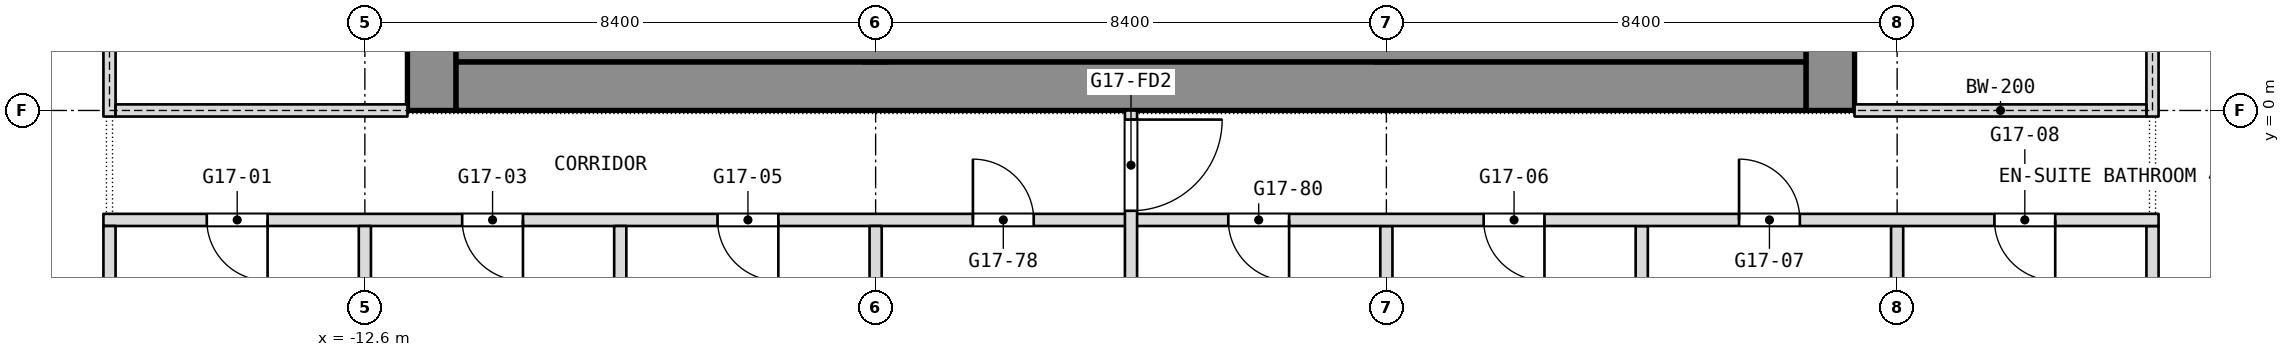
"""IFC4 building model, lengths in metres.
Left out: names, types, materials, properties, quantities, classifications, styles, units other than length and angle.
Written with IfcOpenShell. Run it as: python <this file> out.ifc"""

import sys

from ifc_helpers import new_model, si_unit, direction, frame, frame_2d, origin, place, context, subcontext, project, spatial, rectangle, extrude, element, fill, save


model = new_model("IFC4")
c1 = context("Model", 3, precision=1e-05, world=origin(), true_north=direction((0.0, 1.0)))
c2 = subcontext(c1, "Body", "Model", "MODEL_VIEW")
j1 = project(units=[si_unit("LENGTHUNIT", "METRE"), si_unit("PLANEANGLEUNIT", "RADIAN")], contexts=[c1])
p1 = place(None, origin())
s1 = spatial("IfcSite", under=j1, at=p1, CompositionType="ELEMENT")
p2 = place(p1, origin())
s2 = spatial("IfcBuilding", under=s1, at=p2, CompositionType="ELEMENT")
p3 = place(p2, frame((0.0, 0.0, 212.9)))
s3 = spatial("IfcBuildingStorey", under=s2, at=p3, CompositionType="ELEMENT", Elevation=212.9)
p4 = place(p3, frame((11.5, 0.0, 0.0), z_axis=(0.0, 0.0, 1.0), x_axis=(0.0, 1.0, 0.0)))
e1 = element("IfcWall", 1, at=p4, inside=s3, PredefinedType="SHEAR", context=c2, shape_type="SweptSolid", body=[
    extrude(rectangle(XDim=16.8, YDim=0.8, at=frame_2d((8.4, 0.0))), origin(), (0.0, 0.0, 1.0), 3.6),
])
p5 = place(p4, frame((2.3, 0.0, 0.0)))
e2 = element("IfcOpeningElement", 2, at=p5, cuts=e1, PredefinedType="OPENING", context=c2, shape_type="SweptSolid", body=[
    extrude(rectangle(XDim=1.1, YDim=2.1, at=frame_2d((0.55, 1.05))), frame((0.0, 0.4, 0.0), z_axis=(0.0, -1.0, 0.0), x_axis=(1.0, 0.0, 0.0)), (0.0, 0.0, 1.0), 0.8),
])
p6 = place(p4, frame((4.85, 0.0, 0.0)))
e3 = element("IfcOpeningElement", 3, at=p6, cuts=e1, PredefinedType="OPENING", context=c2, shape_type="SweptSolid", body=[
    extrude(rectangle(XDim=1.1, YDim=2.1, at=frame_2d((0.55, 1.05))), frame((0.0, 0.4, 0.0), z_axis=(0.0, -1.0, 0.0), x_axis=(1.0, 0.0, 0.0)), (0.0, 0.0, 1.0), 0.8),
])
p7 = place(p4, frame((6.825, 0.0, 0.0)))
e4 = element("IfcOpeningElement", 4, at=p7, cuts=e1, PredefinedType="OPENING", context=c2, shape_type="SweptSolid", body=[
    extrude(rectangle(XDim=1.2, YDim=2.1, at=frame_2d((0.6, 1.05))), frame((0.0, 0.4, 0.0), z_axis=(0.0, -1.0, 0.0), x_axis=(1.0, 0.0, 0.0)), (0.0, 0.0, 1.0), 0.8),
])
p8 = place(p4, frame((13.4, 0.0, 0.0)))
e5 = element("IfcOpeningElement", 5, at=p8, cuts=e1, PredefinedType="OPENING", context=c2, shape_type="SweptSolid", body=[
    extrude(rectangle(XDim=1.1, YDim=2.1, at=frame_2d((0.55, 1.05))), frame((0.0, 0.4, 0.0), z_axis=(0.0, -1.0, 0.0), x_axis=(1.0, 0.0, 0.0)), (0.0, 0.0, 1.0), 0.8),
])
p9 = place(p4, frame((10.85, 0.0, 0.0)))
e6 = element("IfcOpeningElement", 6, at=p9, cuts=e1, PredefinedType="OPENING", context=c2, shape_type="SweptSolid", body=[
    extrude(rectangle(XDim=1.1, YDim=2.1, at=frame_2d((0.55, 1.05))), frame((0.0, 0.4, 0.0), z_axis=(0.0, -1.0, 0.0), x_axis=(1.0, 0.0, 0.0)), (0.0, 0.0, 1.0), 0.8),
])
p10 = place(p4, frame((8.775, 0.0, 0.0)))
e7 = element("IfcOpeningElement", 7, at=p10, cuts=e1, PredefinedType="OPENING", context=c2, shape_type="SweptSolid", body=[
    extrude(rectangle(XDim=1.2, YDim=2.1, at=frame_2d((0.6, 1.05))), frame((0.0, 0.4, 0.0), z_axis=(0.0, -1.0, 0.0), x_axis=(1.0, 0.0, 0.0)), (0.0, 0.0, 1.0), 0.8),
])
p11 = place(p3, frame((-11.5, 0.0, 0.0), z_axis=(0.0, 0.0, 1.0), x_axis=(0.0, 1.0, 0.0)))
e8 = element("IfcWall", 8, at=p11, inside=s3, PredefinedType="SHEAR", context=c2, shape_type="SweptSolid", body=[
    extrude(rectangle(XDim=16.8, YDim=0.8, at=frame_2d((8.4, 0.0))), origin(), (0.0, 0.0, 1.0), 3.6),
])
p12 = place(p11, frame((1.762, 0.0, 0.0)))
e9 = element("IfcOpeningElement", 9, at=p12, cuts=e8, PredefinedType="OPENING", context=c2, shape_type="SweptSolid", body=[
    extrude(rectangle(XDim=0.9, YDim=2.1, at=frame_2d((0.45, 1.05))), frame((0.0, 0.4, 0.0), z_axis=(0.0, -1.0, 0.0), x_axis=(1.0, 0.0, 0.0)), (0.0, 0.0, 1.0), 0.8),
])
p13 = place(p11, frame((4.387, 0.0, 0.0)))
e10 = element("IfcOpeningElement", 10, at=p13, cuts=e8, PredefinedType="OPENING", context=c2, shape_type="SweptSolid", body=[
    extrude(rectangle(XDim=0.9, YDim=2.1, at=frame_2d((0.45, 1.05))), frame((0.0, 0.4, 0.0), z_axis=(0.0, -1.0, 0.0), x_axis=(1.0, 0.0, 0.0)), (0.0, 0.0, 1.0), 0.8),
])
p14 = place(p11, frame((6.825, 0.0, 0.0)))
e11 = element("IfcOpeningElement", 11, at=p14, cuts=e8, PredefinedType="OPENING", context=c2, shape_type="SweptSolid", body=[
    extrude(rectangle(XDim=1.2, YDim=2.1, at=frame_2d((0.6, 1.05))), frame((0.0, 0.4, 0.0), z_axis=(0.0, -1.0, 0.0), x_axis=(1.0, 0.0, 0.0)), (0.0, 0.0, 1.0), 0.8),
])
p15 = place(p11, frame((12.3, 0.0, 0.0)))
e12 = element("IfcOpeningElement", 12, at=p15, cuts=e8, PredefinedType="OPENING", context=c2, shape_type="SweptSolid", body=[
    extrude(rectangle(XDim=0.9, YDim=2.1, at=frame_2d((0.45, 1.05))), frame((0.0, 0.4, 0.0), z_axis=(0.0, -1.0, 0.0), x_axis=(1.0, 0.0, 0.0)), (0.0, 0.0, 1.0), 0.8),
])
p16 = place(p11, frame((8.775, 0.0, 0.0)))
e13 = element("IfcOpeningElement", 13, at=p16, cuts=e8, PredefinedType="OPENING", context=c2, shape_type="SweptSolid", body=[
    extrude(rectangle(XDim=1.2, YDim=2.1, at=frame_2d((0.6, 1.05))), frame((0.0, 0.4, 0.0), z_axis=(0.0, -1.0, 0.0), x_axis=(1.0, 0.0, 0.0)), (0.0, 0.0, 1.0), 0.8),
])
p17 = place(p3, frame((-11.1, 0.4, 0.0), z_axis=(0.0, 0.0, 1.0), x_axis=(1.0, 0.0, 0.0)))
e14 = element("IfcWall", 14, at=p17, inside=s3, PredefinedType="SHEAR", context=c2, shape_type="SweptSolid", body=[
    extrude(rectangle(XDim=22.2, YDim=0.8, at=frame_2d((11.1, 0.0))), origin(), (0.0, 0.0, 1.0), 3.6),
])
p18 = place(p3, frame((-4.2, 0.8, 0.0), z_axis=(0.0, 0.0, 1.0), x_axis=(0.0, 1.0, 0.0)))
e15 = element("IfcWall", 15, at=p18, inside=s3, PredefinedType="SHEAR", context=c2, shape_type="SweptSolid", body=[
    extrude(rectangle(XDim=15.2, YDim=0.4, at=frame_2d((7.6, 0.0))), origin(), (0.0, 0.0, 1.0), 3.6),
])
p19 = place(p18, frame((8.5, 0.0, 0.0)))
e16 = element("IfcOpeningElement", 16, at=p19, cuts=e15, PredefinedType="OPENING", context=c2, shape_type="SweptSolid", body=[
    extrude(rectangle(XDim=1.2, YDim=2.1, at=frame_2d((0.6, 1.05))), frame((0.0, 0.2, 0.0), z_axis=(0.0, -1.0, 0.0), x_axis=(1.0, 0.0, 0.0)), (0.0, 0.0, 1.0), 0.4),
])
p20 = place(p3, frame((4.2, 0.8, 0.0), z_axis=(0.0, 0.0, 1.0), x_axis=(0.0, 1.0, 0.0)))
e17 = element("IfcWall", 17, at=p20, inside=s3, PredefinedType="SHEAR", context=c2, shape_type="SweptSolid", body=[
    extrude(rectangle(XDim=15.2, YDim=0.4, at=frame_2d((7.6, 0.0))), origin(), (0.0, 0.0, 1.0), 3.6),
])
p21 = place(p20, frame((5.95, 0.0, 0.0)))
e18 = element("IfcOpeningElement", 18, at=p21, cuts=e17, PredefinedType="OPENING", context=c2, shape_type="SweptSolid", body=[
    extrude(rectangle(XDim=1.2, YDim=2.1, at=frame_2d((0.6, 1.05))), frame((0.0, 0.2, 0.0), z_axis=(0.0, -1.0, 0.0), x_axis=(1.0, 0.0, 0.0)), (0.0, 0.0, 1.0), 0.4),
])
for number, where, z_axis, x_axis in (
    (19, (16.8, -7.8, 0.0), (0.0, 0.0, 1.0), (0.0, 1.0, 0.0)),
    (20, (12.6, -7.8, 0.0), (0.0, 0.0, 1.0), (0.0, 1.0, 0.0)),
):
    element("IfcWall", number, at=place(p3, frame(where, z_axis=z_axis, x_axis=x_axis)), inside=s3, PredefinedType="PARTITIONING", context=c2, shape_type="SweptSolid", body=[
        extrude(rectangle(XDim=5.9, YDim=0.2, at=frame_2d((2.95, 0.0))), origin(), (0.0, 0.0, 1.0), 3.34),
    ])
p22 = place(p3, frame((8.4, -8.0, 0.0), z_axis=(0.0, 0.0, 1.0), x_axis=(0.0, 1.0, 0.0)))
e21 = element("IfcWall", 21, at=p22, inside=s3, PredefinedType="PARTITIONING", context=c2, shape_type="SweptSolid", body=[
    extrude(rectangle(XDim=6.1, YDim=0.2, at=frame_2d((3.05, 0.0))), origin(), (0.0, 0.0, 1.0), 3.34),
])
p23 = place(p3, frame((4.2, -11.6, 0.0), z_axis=(0.0, 0.0, 1.0), x_axis=(0.0, 1.0, 0.0)))
e22 = element("IfcWall", 22, at=p23, inside=s3, PredefinedType="PARTITIONING", context=c2, shape_type="SweptSolid", body=[
    extrude(rectangle(XDim=9.7, YDim=0.2, at=frame_2d((4.85, 0.0))), origin(), (0.0, 0.0, 1.0), 3.34),
])
p24 = place(p3, frame((-16.9, -1.8, 0.0), z_axis=(0.0, 0.0, 1.0), x_axis=(1.0, 0.0, 0.0)))
e23 = element("IfcWall", 23, at=p24, inside=s3, PredefinedType="PARTITIONING", context=c2, shape_type="SweptSolid", body=[
    extrude(rectangle(XDim=33.8, YDim=0.2, at=frame_2d((16.9, 0.0))), origin(), (0.0, 0.0, 1.0), 3.34),
])
p25 = place(p24, frame((1.7, 0.0, 0.0)))
e24 = element("IfcOpeningElement", 24, at=p25, cuts=e23, PredefinedType="OPENING", context=c2, shape_type="SweptSolid", body=[
    extrude(rectangle(XDim=1.0, YDim=2.1, at=frame_2d((0.5, 1.05))), frame((0.0, 0.1, 0.0), z_axis=(0.0, -1.0, 0.0), x_axis=(1.0, 0.0, 0.0)), (0.0, 0.0, 1.0), 0.2),
])
p26 = place(p24, frame((5.9, 0.0, 0.0)))
e25 = element("IfcOpeningElement", 25, at=p26, cuts=e23, PredefinedType="OPENING", context=c2, shape_type="SweptSolid", body=[
    extrude(rectangle(XDim=1.0, YDim=2.1, at=frame_2d((0.5, 1.05))), frame((0.0, 0.1, 0.0), z_axis=(0.0, -1.0, 0.0), x_axis=(1.0, 0.0, 0.0)), (0.0, 0.0, 1.0), 0.2),
])
p27 = place(p24, frame((10.1, 0.0, 0.0)))
e26 = element("IfcOpeningElement", 26, at=p27, cuts=e23, PredefinedType="OPENING", context=c2, shape_type="SweptSolid", body=[
    extrude(rectangle(XDim=1.0, YDim=2.1, at=frame_2d((0.5, 1.05))), frame((0.0, 0.1, 0.0), z_axis=(0.0, -1.0, 0.0), x_axis=(1.0, 0.0, 0.0)), (0.0, 0.0, 1.0), 0.2),
])
p28 = place(p24, frame((22.7, 0.0, 0.0)))
e27 = element("IfcOpeningElement", 27, at=p28, cuts=e23, PredefinedType="OPENING", context=c2, shape_type="SweptSolid", body=[
    extrude(rectangle(XDim=1.0, YDim=2.1, at=frame_2d((0.5, 1.05))), frame((0.0, 0.1, 0.0), z_axis=(0.0, -1.0, 0.0), x_axis=(1.0, 0.0, 0.0)), (0.0, 0.0, 1.0), 0.2),
])
p29 = place(p24, frame((26.9, 0.0, 0.0)))
e28 = element("IfcOpeningElement", 28, at=p29, cuts=e23, PredefinedType="OPENING", context=c2, shape_type="SweptSolid", body=[
    extrude(rectangle(XDim=1.0, YDim=2.1, at=frame_2d((0.5, 1.05))), frame((0.0, 0.1, 0.0), z_axis=(0.0, -1.0, 0.0), x_axis=(1.0, 0.0, 0.0)), (0.0, 0.0, 1.0), 0.2),
])
p30 = place(p24, frame((31.1, 0.0, 0.0)))
e29 = element("IfcOpeningElement", 29, at=p30, cuts=e23, PredefinedType="OPENING", context=c2, shape_type="SweptSolid", body=[
    extrude(rectangle(XDim=1.0, YDim=2.1, at=frame_2d((0.5, 1.05))), frame((0.0, 0.1, 0.0), z_axis=(0.0, -1.0, 0.0), x_axis=(1.0, 0.0, 0.0)), (0.0, 0.0, 1.0), 0.2),
])
p31 = place(p24, frame((14.3, 0.0, 0.0)))
e30 = element("IfcOpeningElement", 30, at=p31, cuts=e23, PredefinedType="OPENING", context=c2, shape_type="SweptSolid", body=[
    extrude(rectangle(XDim=1.0, YDim=2.1, at=frame_2d((0.5, 1.05))), frame((0.0, 0.1, 0.0), z_axis=(0.0, -1.0, 0.0), x_axis=(1.0, 0.0, 0.0)), (0.0, 0.0, 1.0), 0.2),
])
p32 = place(p24, frame((18.5, 0.0, 0.0)))
e31 = element("IfcOpeningElement", 31, at=p32, cuts=e23, PredefinedType="OPENING", context=c2, shape_type="SweptSolid", body=[
    extrude(rectangle(XDim=1.0, YDim=2.1, at=frame_2d((0.5, 1.05))), frame((0.0, 0.1, 0.0), z_axis=(0.0, -1.0, 0.0), x_axis=(1.0, 0.0, 0.0)), (0.0, 0.0, 1.0), 0.2),
])
p33 = place(p3, frame((0.0, -13.6, 0.0), z_axis=(0.0, 0.0, 1.0), x_axis=(0.0, 1.0, 0.0)))
e32 = element("IfcWall", 32, at=p33, inside=s3, PredefinedType="PARTITIONING", context=c2, shape_type="SweptSolid", body=[
    extrude(rectangle(XDim=13.6, YDim=0.2, at=frame_2d((6.8, 0.0))), origin(), (0.0, 0.0, 1.0), 3.34),
])
p34 = place(p33, frame((11.95, 0.0, 0.0)))
e33 = element("IfcOpeningElement", 33, at=p34, cuts=e32, PredefinedType="OPENING", context=c2, shape_type="SweptSolid", body=[
    extrude(rectangle(XDim=1.5, YDim=2.1, at=frame_2d((0.75, 1.05))), frame((0.0, 0.1, 0.0), z_axis=(0.0, -1.0, 0.0), x_axis=(1.0, 0.0, 0.0)), (0.0, 0.0, 1.0), 0.2),
])
p35 = place(p33, frame((0.25, 0.0, 0.0)))
e34 = element("IfcOpeningElement", 34, at=p35, cuts=e32, PredefinedType="OPENING", context=c2, shape_type="SweptSolid", body=[
    extrude(rectangle(XDim=1.5, YDim=2.1, at=frame_2d((0.75, 1.05))), frame((0.0, 0.1, 0.0), z_axis=(0.0, -1.0, 0.0), x_axis=(1.0, 0.0, 0.0)), (0.0, 0.0, 1.0), 0.2),
])
p36 = place(p3, frame((-4.2, -11.6, 0.0), z_axis=(0.0, 0.0, 1.0), x_axis=(0.0, 1.0, 0.0)))
e35 = element("IfcWall", 35, at=p36, inside=s3, PredefinedType="PARTITIONING", context=c2, shape_type="SweptSolid", body=[
    extrude(rectangle(XDim=9.7, YDim=0.2, at=frame_2d((4.85, 0.0))), origin(), (0.0, 0.0, 1.0), 3.34),
])
p37 = place(p3, frame((-8.4, -8.0, 0.0), z_axis=(0.0, 0.0, 1.0), x_axis=(0.0, 1.0, 0.0)))
e36 = element("IfcWall", 36, at=p37, inside=s3, PredefinedType="PARTITIONING", context=c2, shape_type="SweptSolid", body=[
    extrude(rectangle(XDim=6.1, YDim=0.2, at=frame_2d((3.05, 0.0))), origin(), (0.0, 0.0, 1.0), 3.34),
])
p38 = place(p3, frame((-12.6, -7.8, 0.0), z_axis=(0.0, 0.0, 1.0), x_axis=(0.0, 1.0, 0.0)))
e37 = element("IfcWall", 37, at=p38, inside=s3, PredefinedType="PARTITIONING", context=c2, shape_type="SweptSolid", body=[
    extrude(rectangle(XDim=5.9, YDim=0.2, at=frame_2d((2.95, 0.0))), origin(), (0.0, 0.0, 1.0), 3.34),
])
p39 = place(p3, frame((-16.8, -8.0, 0.0), z_axis=(0.0, 0.0, 1.0), x_axis=(0.0, 1.0, 0.0)))
e38 = element("IfcWall", 38, at=p39, inside=s3, PredefinedType="PARTITIONING", context=c2, shape_type="SweptSolid", body=[
    extrude(rectangle(XDim=6.1, YDim=0.2, at=frame_2d((3.05, 0.0))), origin(), (0.0, 0.0, 1.0), 3.34),
])
p40 = place(p3, frame((-11.1, 1.15, 0.0), z_axis=(0.0, 0.0, 1.0), x_axis=(1.0, 0.0, 0.0)))
e39 = element("IfcWall", 39, at=p40, inside=s3, PredefinedType="PARTITIONING", context=c2, shape_type="SweptSolid", body=[
    extrude(rectangle(XDim=22.2, YDim=0.7, at=frame_2d((11.1, 0.0))), origin(), (0.0, 0.0, 1.0), 3.34),
])
p41 = place(p3, frame((-16.8, -0.1, 0.0), z_axis=(0.0, 0.0, 1.0), x_axis=(0.0, 1.0, 0.0)))
e40 = element("IfcWall", 40, at=p41, inside=s3, PredefinedType="PARTITIONING", context=c2, shape_type="SweptSolid", body=[
    extrude(rectangle(XDim=17.0, YDim=0.2, at=frame_2d((8.5, 0.0))), origin(), (0.0, 0.0, 1.0), 3.34),
])
p42 = place(p41, frame((2.2, 0.0, 0.0)))
e41 = element("IfcOpeningElement", 41, at=p42, cuts=e40, PredefinedType="OPENING", context=c2, shape_type="SweptSolid", body=[
    extrude(rectangle(XDim=1.8, YDim=2.1, at=frame_2d((0.9, 1.05))), frame((0.0, 0.1, 0.0), z_axis=(0.0, -1.0, 0.0), x_axis=(1.0, 0.0, 0.0)), (0.0, 0.0, 1.0), 0.2),
])
p43 = place(p41, frame((13.0, 0.0, 0.0)))
e42 = element("IfcOpeningElement", 42, at=p43, cuts=e40, PredefinedType="OPENING", context=c2, shape_type="SweptSolid", body=[
    extrude(rectangle(XDim=1.8, YDim=2.1, at=frame_2d((0.9, 1.05))), frame((0.0, 0.1, 0.0), z_axis=(0.0, -1.0, 0.0), x_axis=(1.0, 0.0, 0.0)), (0.0, 0.0, 1.0), 0.2),
])
p44 = place(p3, frame((-16.7, 0.0, 0.0), z_axis=(0.0, 0.0, 1.0), x_axis=(1.0, 0.0, 0.0)))
e43 = element("IfcWall", 43, at=p44, inside=s3, PredefinedType="PARTITIONING", context=c2, shape_type="SweptSolid", body=[
    extrude(rectangle(XDim=4.8, YDim=0.2, at=frame_2d((2.4, 0.0))), origin(), (0.0, 0.0, 1.0), 2.94),
])
p45 = place(p3, frame((16.8, -0.1, 0.0), z_axis=(0.0, 0.0, 1.0), x_axis=(0.0, 1.0, 0.0)))
e44 = element("IfcWall", 44, at=p45, inside=s3, PredefinedType="PARTITIONING", context=c2, shape_type="SweptSolid", body=[
    extrude(rectangle(XDim=17.0, YDim=0.2, at=frame_2d((8.5, 0.0))), origin(), (0.0, 0.0, 1.0), 3.34),
])
p46 = place(p45, frame((2.2, 0.0, 0.0)))
e45 = element("IfcOpeningElement", 45, at=p46, cuts=e44, PredefinedType="OPENING", context=c2, shape_type="SweptSolid", body=[
    extrude(rectangle(XDim=1.8, YDim=2.1, at=frame_2d((0.9, 1.05))), frame((0.0, 0.1, 0.0), z_axis=(0.0, -1.0, 0.0), x_axis=(1.0, 0.0, 0.0)), (0.0, 0.0, 1.0), 0.2),
])
p47 = place(p45, frame((13.0, 0.0, 0.0)))
e46 = element("IfcOpeningElement", 46, at=p47, cuts=e44, PredefinedType="OPENING", context=c2, shape_type="SweptSolid", body=[
    extrude(rectangle(XDim=1.8, YDim=2.1, at=frame_2d((0.9, 1.05))), frame((0.0, 0.1, 0.0), z_axis=(0.0, -1.0, 0.0), x_axis=(1.0, 0.0, 0.0)), (0.0, 0.0, 1.0), 0.2),
])
p48 = place(p3, frame((11.9, 0.0, 0.0), z_axis=(0.0, 0.0, 1.0), x_axis=(1.0, 0.0, 0.0)))
e47 = element("IfcWall", 47, at=p48, inside=s3, PredefinedType="PARTITIONING", context=c2, shape_type="SweptSolid", body=[
    extrude(rectangle(XDim=4.8, YDim=0.2, at=frame_2d((2.4, 0.0))), origin(), (0.0, 0.0, 1.0), 2.94),
])
p49 = place(p25, origin())
e48 = element("IfcDoor", 48, at=p49, inside=s3, OperationType="SINGLE_SWING_LEFT", PredefinedType="DOOR", context=c2, shape_type="SweptSolid", body=[
    extrude(rectangle(XDim=1.0, YDim=2.1, at=frame_2d((0.5, 1.05))), frame((0.0, 0.025, 0.0), z_axis=(0.0, -1.0, 0.0), x_axis=(1.0, 0.0, 0.0)), (0.0, 0.0, 1.0), 0.05),
])
fill(e24, e48)
p50 = place(p26, origin())
e49 = element("IfcDoor", 49, at=p50, inside=s3, OperationType="SINGLE_SWING_LEFT", PredefinedType="DOOR", context=c2, shape_type="SweptSolid", body=[
    extrude(rectangle(XDim=1.0, YDim=2.1, at=frame_2d((0.5, 1.05))), frame((0.0, 0.025, 0.0), z_axis=(0.0, -1.0, 0.0), x_axis=(1.0, 0.0, 0.0)), (0.0, 0.0, 1.0), 0.05),
])
fill(e25, e49)
p51 = place(p27, origin())
e50 = element("IfcDoor", 50, at=p51, inside=s3, OperationType="SINGLE_SWING_RIGHT", PredefinedType="DOOR", context=c2, shape_type="SweptSolid", body=[
    extrude(rectangle(XDim=1.0, YDim=2.1, at=frame_2d((0.5, 1.05))), frame((0.0, 0.025, 0.0), z_axis=(0.0, -1.0, 0.0), x_axis=(1.0, 0.0, 0.0)), (0.0, 0.0, 1.0), 0.05),
])
fill(e26, e50)
p52 = place(p28, origin())
e51 = element("IfcDoor", 51, at=p52, inside=s3, OperationType="SINGLE_SWING_LEFT", PredefinedType="DOOR", context=c2, shape_type="SweptSolid", body=[
    extrude(rectangle(XDim=1.0, YDim=2.1, at=frame_2d((0.5, 1.05))), frame((0.0, 0.025, 0.0), z_axis=(0.0, -1.0, 0.0), x_axis=(1.0, 0.0, 0.0)), (0.0, 0.0, 1.0), 0.05),
])
fill(e27, e51)
p53 = place(p29, origin())
e52 = element("IfcDoor", 52, at=p53, inside=s3, OperationType="SINGLE_SWING_RIGHT", PredefinedType="DOOR", context=c2, shape_type="SweptSolid", body=[
    extrude(rectangle(XDim=1.0, YDim=2.1, at=frame_2d((0.5, 1.05))), frame((0.0, 0.025, 0.0), z_axis=(0.0, -1.0, 0.0), x_axis=(1.0, 0.0, 0.0)), (0.0, 0.0, 1.0), 0.05),
])
fill(e28, e52)
p54 = place(p30, origin())
e53 = element("IfcDoor", 53, at=p54, inside=s3, OperationType="SINGLE_SWING_LEFT", PredefinedType="DOOR", context=c2, shape_type="SweptSolid", body=[
    extrude(rectangle(XDim=1.0, YDim=2.1, at=frame_2d((0.5, 1.05))), frame((0.0, 0.025, 0.0), z_axis=(0.0, -1.0, 0.0), x_axis=(1.0, 0.0, 0.0)), (0.0, 0.0, 1.0), 0.05),
])
fill(e29, e53)
p55 = place(p31, origin())
e54 = element("IfcDoor", 54, at=p55, inside=s3, OperationType="SINGLE_SWING_LEFT", PredefinedType="DOOR", context=c2, shape_type="SweptSolid", body=[
    extrude(rectangle(XDim=1.0, YDim=2.1, at=frame_2d((0.5, 1.05))), frame((0.0, 0.025, 0.0), z_axis=(0.0, -1.0, 0.0), x_axis=(1.0, 0.0, 0.0)), (0.0, 0.0, 1.0), 0.05),
])
fill(e30, e54)
p56 = place(p32, origin())
e55 = element("IfcDoor", 55, at=p56, inside=s3, OperationType="SINGLE_SWING_LEFT", PredefinedType="DOOR", context=c2, shape_type="SweptSolid", body=[
    extrude(rectangle(XDim=1.0, YDim=2.1, at=frame_2d((0.5, 1.05))), frame((0.0, 0.025, 0.0), z_axis=(0.0, -1.0, 0.0), x_axis=(1.0, 0.0, 0.0)), (0.0, 0.0, 1.0), 0.05),
])
fill(e31, e55)
p57 = place(p34, origin())
e56 = element("IfcDoor", 56, at=p57, inside=s3, OperationType="DOUBLE_DOOR_DOUBLE_SWING", PredefinedType="DOOR", context=c2, shape_type="SweptSolid", body=[
    extrude(rectangle(XDim=1.5, YDim=2.1, at=frame_2d((0.75, 1.05))), frame((0.0, 0.025, 0.0), z_axis=(0.0, -1.0, 0.0), x_axis=(1.0, 0.0, 0.0)), (0.0, 0.0, 1.0), 0.05),
])
fill(e33, e56)
save(model, sys.argv[1])
